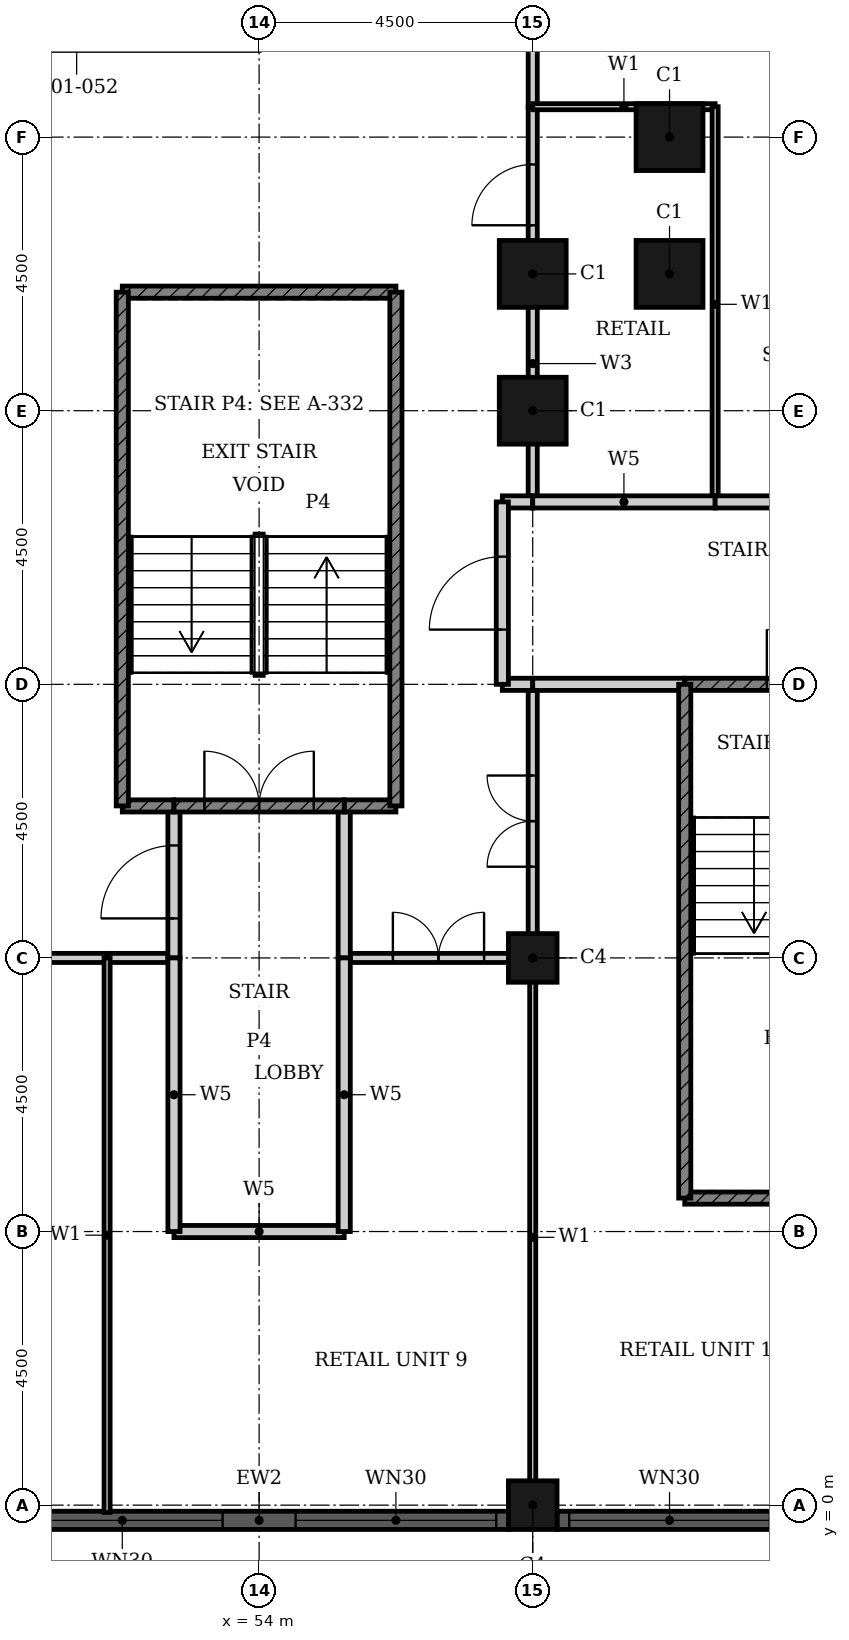
"""IFC4 building model, lengths in metres.
Left out: names, types, materials, properties, quantities, classifications, styles, units other than length and angle.
Written with IfcOpenShell. Run it as: python <this file> out.ifc"""

import sys

from ifc_helpers import new_model, si_unit, direction, frame, frame_2d, origin, origin_2d, place, context, subcontext, project, spatial, rectangle, hollow_rectangle, extrude, element, fill, save


model = new_model("IFC4")
c1 = context("Model", 3, precision=1e-05, world=origin(), true_north=direction((0.0, 1.0)))
c2 = subcontext(c1, "Body", "Model", "MODEL_VIEW")
j1 = project(units=[si_unit("LENGTHUNIT", "METRE"), si_unit("PLANEANGLEUNIT", "RADIAN")], contexts=[c1])
p1 = place(None, origin())
s1 = spatial("IfcSite", under=j1, at=p1, CompositionType="ELEMENT")
p2 = place(p1, origin())
s2 = spatial("IfcBuilding", under=s1, at=p2, CompositionType="ELEMENT")
p3 = place(p2, frame((0.0, 0.0, 6.6)))
s3 = spatial("IfcBuildingStorey", under=s2, at=p3, CompositionType="ELEMENT", Elevation=6.6)
for number, where, z_axis, x_axis in (
    (1, (58.5, 18.0, 0.0), (0.0, 0.0, 1.0), (1.0, 0.0, 0.0)),
    (2, (58.5, 20.25, 0.0), (0.0, 0.0, 1.0), (1.0, 0.0, 0.0)),
    (3, (60.75, 20.25, 0.0), (0.0, 0.0, 1.0), (1.0, 0.0, 0.0)),
    (4, (60.75, 22.5, 0.0), (0.0, 0.0, 1.0), (1.0, 0.0, 0.0)),
):
    element("IfcColumn", number, at=place(p3, frame(where, z_axis=z_axis, x_axis=x_axis)), inside=s3, PredefinedType="COLUMN", context=c2, shape_type="SweptSolid", body=[
        extrude(hollow_rectangle(XDim=1.1, YDim=1.1, WallThickness=0.036, at=origin_2d()), origin(), (0.0, 0.0, 1.0), 5.4),
    ])
for number, where, z_axis, x_axis in (
    (5, (58.5, 0.0, 0.0), (0.0, 0.0, 1.0), (1.0, 0.0, 0.0)),
    (6, (58.5, 9.0, 0.0), (0.0, 0.0, 1.0), (1.0, 0.0, 0.0)),
):
    element("IfcColumn", number, at=place(p3, frame(where, z_axis=z_axis, x_axis=x_axis)), inside=s3, PredefinedType="COLUMN", context=c2, shape_type="SweptSolid", body=[
        extrude(hollow_rectangle(XDim=0.8, YDim=0.8, WallThickness=0.025, at=origin_2d()), origin(), (0.0, 0.0, 1.0), 5.4),
    ])
p4 = place(p3, frame((49.9, -0.25, 0.0), z_axis=(0.0, 0.0, 1.0), x_axis=(1.0, 0.0, 0.0)))
e7 = element("IfcWall", 7, at=p4, inside=s3, PredefinedType="SOLIDWALL", context=c2, shape_type="SweptSolid", body=[
    extrude(rectangle(XDim=8.2, YDim=0.3, at=frame_2d((4.1, 0.0))), origin(), (0.0, 0.0, 1.0), 5.4),
])
p5 = place(p4, frame((0.2, 0.0, 0.9)))
e8 = element("IfcOpeningElement", 8, at=p5, cuts=e7, PredefinedType="OPENING", context=c2, shape_type="SweptSolid", body=[
    extrude(rectangle(XDim=3.3, YDim=3.5, at=frame_2d((1.65, 1.75))), frame((0.0, 0.16, 0.0), z_axis=(0.0, -1.0, 0.0), x_axis=(1.0, 0.0, 0.0)), (0.0, 0.0, 1.0), 0.32),
])
p6 = place(p4, frame((4.7, 0.0, 0.9)))
e9 = element("IfcOpeningElement", 9, at=p6, cuts=e7, PredefinedType="OPENING", context=c2, shape_type="SweptSolid", body=[
    extrude(rectangle(XDim=3.3, YDim=3.5, at=frame_2d((1.65, 1.75))), frame((0.0, 0.16, 0.0), z_axis=(0.0, -1.0, 0.0), x_axis=(1.0, 0.0, 0.0)), (0.0, 0.0, 1.0), 0.32),
])
p7 = place(p3, frame((58.9, -0.25, 0.0), z_axis=(0.0, 0.0, 1.0), x_axis=(1.0, 0.0, 0.0)))
e10 = element("IfcWall", 10, at=p7, inside=s3, PredefinedType="SOLIDWALL", context=c2, shape_type="SweptSolid", body=[
    extrude(rectangle(XDim=8.2, YDim=0.3, at=frame_2d((4.1, 0.0))), origin(), (0.0, 0.0, 1.0), 5.4),
])
p8 = place(p7, frame((0.2, 0.0, 0.9)))
e11 = element("IfcOpeningElement", 11, at=p8, cuts=e10, PredefinedType="OPENING", context=c2, shape_type="SweptSolid", body=[
    extrude(rectangle(XDim=3.3, YDim=3.5, at=frame_2d((1.65, 1.75))), frame((0.0, 0.16, 0.0), z_axis=(0.0, -1.0, 0.0), x_axis=(1.0, 0.0, 0.0)), (0.0, 0.0, 1.0), 0.32),
])
p9 = place(p7, frame((4.7, 0.0, 0.9)))
e12 = element("IfcOpeningElement", 12, at=p9, cuts=e10, PredefinedType="OPENING", context=c2, shape_type="SweptSolid", body=[
    extrude(rectangle(XDim=3.3, YDim=3.5, at=frame_2d((1.65, 1.75))), frame((0.0, 0.16, 0.0), z_axis=(0.0, -1.0, 0.0), x_axis=(1.0, 0.0, 0.0)), (0.0, 0.0, 1.0), 0.32),
])
p10 = place(p3, frame((41.5, 9.0, 0.0), z_axis=(0.0, 0.0, 1.0), x_axis=(1.0, 0.0, 0.0)))
e13 = element("IfcWall", 13, at=p10, inside=s3, PredefinedType="PARTITIONING", context=c2, shape_type="SweptSolid", body=[
    extrude(rectangle(XDim=10.0, YDim=0.15, at=frame_2d((5.0, 0.0))), origin(), (0.0, 0.0, 1.0), 5.05),
])
p11 = place(p10, frame((4.25, 0.0, 0.0)))
e14 = element("IfcOpeningElement", 14, at=p11, cuts=e13, PredefinedType="OPENING", context=c2, shape_type="SweptSolid", body=[
    extrude(rectangle(XDim=1.5, YDim=2.4, at=frame_2d((0.75, 1.2))), frame((0.0, 0.085, 0.0), z_axis=(0.0, -1.0, 0.0), x_axis=(1.0, 0.0, 0.0)), (0.0, 0.0, 1.0), 0.17),
])
p12 = place(p3, frame((51.5, 9.0, 0.0), z_axis=(0.0, 0.0, 1.0), x_axis=(1.0, 0.0, 0.0)))
e15 = element("IfcWall", 15, at=p12, inside=s3, PredefinedType="PARTITIONING", context=c2, shape_type="SweptSolid", body=[
    extrude(rectangle(XDim=1.1, YDim=0.15, at=frame_2d((0.55, 0.0))), origin(), (0.0, 0.0, 1.0), 5.05),
])
p13 = place(p3, frame((55.4, 9.0, 0.0), z_axis=(0.0, 0.0, 1.0), x_axis=(1.0, 0.0, 0.0)))
e16 = element("IfcWall", 16, at=p13, inside=s3, PredefinedType="PARTITIONING", context=c2, shape_type="SweptSolid", body=[
    extrude(rectangle(XDim=3.1, YDim=0.15, at=frame_2d((1.55, 0.0))), origin(), (0.0, 0.0, 1.0), 5.05),
])
p14 = place(p13, frame((0.8, 0.0, 0.0)))
e17 = element("IfcOpeningElement", 17, at=p14, cuts=e16, PredefinedType="OPENING", context=c2, shape_type="SweptSolid", body=[
    extrude(rectangle(XDim=1.5, YDim=2.4, at=frame_2d((0.75, 1.2))), frame((0.0, 0.085, 0.0), z_axis=(0.0, -1.0, 0.0), x_axis=(1.0, 0.0, 0.0)), (0.0, 0.0, 1.0), 0.17),
])
p15 = place(p3, frame((58.5, 16.5, 0.0), z_axis=(0.0, 0.0, 1.0), x_axis=(0.0, 1.0, 0.0)))
e18 = element("IfcWall", 18, at=p15, inside=s3, PredefinedType="PARTITIONING", context=c2, shape_type="SweptSolid", body=[
    extrude(rectangle(XDim=6.5, YDim=0.15, at=frame_2d((3.25, 0.0))), origin(), (0.0, 0.0, 1.0), 5.05),
])
p16 = place(p15, frame((4.55, 0.0, 0.0)))
e19 = element("IfcOpeningElement", 19, at=p16, cuts=e18, PredefinedType="OPENING", context=c2, shape_type="SweptSolid", body=[
    extrude(rectangle(XDim=1.0, YDim=2.1, at=frame_2d((0.5, 1.05))), frame((0.0, 0.085, 0.0), z_axis=(0.0, -1.0, 0.0), x_axis=(1.0, 0.0, 0.0)), (0.0, 0.0, 1.0), 0.17),
])
p17 = place(p3, frame((58.5, 9.0, 0.0), z_axis=(0.0, 0.0, 1.0), x_axis=(0.0, 1.0, 0.0)))
e20 = element("IfcWall", 20, at=p17, inside=s3, PredefinedType="PARTITIONING", context=c2, shape_type="SweptSolid", body=[
    extrude(rectangle(XDim=4.5, YDim=0.15, at=frame_2d((2.25, 0.0))), origin(), (0.0, 0.0, 1.0), 5.05),
])
p18 = place(p17, frame((1.5, 0.0, 0.0)))
e21 = element("IfcOpeningElement", 21, at=p18, cuts=e20, PredefinedType="OPENING", context=c2, shape_type="SweptSolid", body=[
    extrude(rectangle(XDim=1.5, YDim=2.4, at=frame_2d((0.75, 1.2))), frame((0.0, 0.085, 0.0), z_axis=(0.0, -1.0, 0.0), x_axis=(1.0, 0.0, 0.0)), (0.0, 0.0, 1.0), 0.17),
])
p19 = place(p3, frame((58.5, 23.0, 0.0), z_axis=(0.0, 0.0, 1.0), x_axis=(0.0, 1.0, 0.0)))
e22 = element("IfcWall", 22, at=p19, inside=s3, PredefinedType="PARTITIONING", context=c2, shape_type="SweptSolid", body=[
    extrude(rectangle(XDim=6.5, YDim=0.15, at=frame_2d((3.25, 0.0))), origin(), (0.0, 0.0, 1.0), 5.05),
])
p20 = place(p19, frame((1.6, 0.0, 0.0)))
e23 = element("IfcOpeningElement", 23, at=p20, cuts=e22, PredefinedType="OPENING", context=c2, shape_type="SweptSolid", body=[
    extrude(rectangle(XDim=1.5, YDim=2.4, at=frame_2d((0.75, 1.2))), frame((0.0, 0.085, 0.0), z_axis=(0.0, -1.0, 0.0), x_axis=(1.0, 0.0, 0.0)), (0.0, 0.0, 1.0), 0.17),
])
p21 = place(p3, frame((58.5, 23.0, 0.0), z_axis=(0.0, 0.0, 1.0), x_axis=(1.0, 0.0, 0.0)))
e24 = element("IfcWall", 24, at=p21, inside=s3, PredefinedType="PARTITIONING", context=c2, shape_type="SweptSolid", body=[
    extrude(rectangle(XDim=3.0, YDim=0.1, at=frame_2d((1.5, 0.0))), origin(), (0.0, 0.0, 1.0), 5.05),
])
p22 = place(p3, frame((51.5, -0.12, 0.0), z_axis=(0.0, 0.0, 1.0), x_axis=(0.0, 1.0, 0.0)))
e25 = element("IfcWall", 25, at=p22, inside=s3, PredefinedType="PARTITIONING", context=c2, shape_type="SweptSolid", body=[
    extrude(rectangle(XDim=9.12, YDim=0.1, at=frame_2d((4.56, 0.0))), origin(), (0.0, 0.0, 1.0), 5.05),
])
p23 = place(p3, frame((58.5, -0.19, 0.0), z_axis=(0.0, 0.0, 1.0), x_axis=(0.0, 1.0, 0.0)))
e26 = element("IfcWall", 26, at=p23, inside=s3, PredefinedType="PARTITIONING", context=c2, shape_type="SweptSolid", body=[
    extrude(rectangle(XDim=9.19, YDim=0.1, at=frame_2d((4.595, 0.0))), origin(), (0.0, 0.0, 1.0), 5.05),
])
p24 = place(p3, frame((61.5, 16.5, 0.0), z_axis=(0.0, 0.0, 1.0), x_axis=(0.0, 1.0, 0.0)))
e27 = element("IfcWall", 27, at=p24, inside=s3, PredefinedType="PARTITIONING", context=c2, shape_type="SweptSolid", body=[
    extrude(rectangle(XDim=6.5, YDim=0.1, at=frame_2d((3.25, 0.0))), origin(), (0.0, 0.0, 1.0), 5.05),
])
p25 = place(p3, frame((58.0, 13.5, 0.0), z_axis=(0.0, 0.0, 1.0), x_axis=(1.0, 0.0, 0.0)))
e28 = element("IfcWall", 28, at=p25, inside=s3, PredefinedType="PARTITIONING", context=c2, shape_type="SweptSolid", body=[
    extrude(rectangle(XDim=0.5, YDim=0.2, at=frame_2d((0.25, 0.0))), origin(), (0.0, 0.0, 1.0), 5.05),
])
p26 = place(p3, frame((58.5, 13.5, 0.0), z_axis=(0.0, 0.0, 1.0), x_axis=(1.0, 0.0, 0.0)))
e29 = element("IfcWall", 29, at=p26, inside=s3, PredefinedType="PARTITIONING", context=c2, shape_type="SweptSolid", body=[
    extrude(rectangle(XDim=2.5, YDim=0.2, at=frame_2d((1.25, 0.0))), origin(), (0.0, 0.0, 1.0), 5.05),
])
p27 = place(p3, frame((58.0, 16.5, 0.0), z_axis=(0.0, 0.0, 1.0), x_axis=(1.0, 0.0, 0.0)))
e30 = element("IfcWall", 30, at=p27, inside=s3, PredefinedType="PARTITIONING", context=c2, shape_type="SweptSolid", body=[
    extrude(rectangle(XDim=0.5, YDim=0.2, at=frame_2d((0.25, 0.0))), origin(), (0.0, 0.0, 1.0), 5.05),
])
p28 = place(p3, frame((58.5, 16.5, 0.0), z_axis=(0.0, 0.0, 1.0), x_axis=(1.0, 0.0, 0.0)))
e31 = element("IfcWall", 31, at=p28, inside=s3, PredefinedType="PARTITIONING", context=c2, shape_type="SweptSolid", body=[
    extrude(rectangle(XDim=3.0, YDim=0.2, at=frame_2d((1.5, 0.0))), origin(), (0.0, 0.0, 1.0), 5.05),
])
p29 = place(p3, frame((61.5, 16.5, 0.0), z_axis=(0.0, 0.0, 1.0), x_axis=(1.0, 0.0, 0.0)))
e32 = element("IfcWall", 32, at=p29, inside=s3, PredefinedType="PARTITIONING", context=c2, shape_type="SweptSolid", body=[
    extrude(rectangle(XDim=6.12, YDim=0.2, at=frame_2d((3.06, 0.0))), origin(), (0.0, 0.0, 1.0), 5.05),
])
p30 = place(p3, frame((52.6, 4.5, 0.0), z_axis=(0.0, 0.0, 1.0), x_axis=(1.0, 0.0, 0.0)))
e33 = element("IfcWall", 33, at=p30, inside=s3, PredefinedType="PARTITIONING", context=c2, shape_type="SweptSolid", body=[
    extrude(rectangle(XDim=2.8, YDim=0.2, at=frame_2d((1.4, 0.0))), origin(), (0.0, 0.0, 1.0), 5.05),
])
p31 = place(p3, frame((52.6, 9.0, 0.0), z_axis=(0.0, 0.0, 1.0), x_axis=(0.0, 1.0, 0.0)))
e34 = element("IfcWall", 34, at=p31, inside=s3, PredefinedType="PARTITIONING", context=c2, shape_type="SweptSolid", body=[
    extrude(rectangle(XDim=2.5, YDim=0.2, at=frame_2d((1.25, 0.0))), origin(), (0.0, 0.0, 1.0), 5.05),
])
p32 = place(p31, frame((0.65, 0.0, 0.0)))
e35 = element("IfcOpeningElement", 35, at=p32, cuts=e34, PredefinedType="OPENING", context=c2, shape_type="SweptSolid", body=[
    extrude(rectangle(XDim=1.2, YDim=2.1, at=frame_2d((0.6, 1.05))), frame((0.0, 0.11, 0.0), z_axis=(0.0, -1.0, 0.0), x_axis=(1.0, 0.0, 0.0)), (0.0, 0.0, 1.0), 0.22),
])
p33 = place(p3, frame((52.6, 4.5, 0.0), z_axis=(0.0, 0.0, 1.0), x_axis=(0.0, 1.0, 0.0)))
e36 = element("IfcWall", 36, at=p33, inside=s3, PredefinedType="PARTITIONING", context=c2, shape_type="SweptSolid", body=[
    extrude(rectangle(XDim=4.5, YDim=0.2, at=frame_2d((2.25, 0.0))), origin(), (0.0, 0.0, 1.0), 5.05),
])
p34 = place(p3, frame((55.4, 9.0, 0.0), z_axis=(0.0, 0.0, 1.0), x_axis=(0.0, 1.0, 0.0)))
e37 = element("IfcWall", 37, at=p34, inside=s3, PredefinedType="PARTITIONING", context=c2, shape_type="SweptSolid", body=[
    extrude(rectangle(XDim=2.5, YDim=0.2, at=frame_2d((1.25, 0.0))), origin(), (0.0, 0.0, 1.0), 5.05),
])
p35 = place(p3, frame((55.4, 4.5, 0.0), z_axis=(0.0, 0.0, 1.0), x_axis=(0.0, 1.0, 0.0)))
e38 = element("IfcWall", 38, at=p35, inside=s3, PredefinedType="PARTITIONING", context=c2, shape_type="SweptSolid", body=[
    extrude(rectangle(XDim=4.5, YDim=0.2, at=frame_2d((2.25, 0.0))), origin(), (0.0, 0.0, 1.0), 5.05),
])
p36 = place(p3, frame((58.0, 13.5, 0.0), z_axis=(0.0, 0.0, 1.0), x_axis=(0.0, 1.0, 0.0)))
e39 = element("IfcWall", 39, at=p36, inside=s3, PredefinedType="PARTITIONING", context=c2, shape_type="SweptSolid", body=[
    extrude(rectangle(XDim=3.0, YDim=0.2, at=frame_2d((1.5, 0.0))), origin(), (0.0, 0.0, 1.0), 5.05),
])
p37 = place(p36, frame((0.9, 0.0, 0.0)))
e40 = element("IfcOpeningElement", 40, at=p37, cuts=e39, PredefinedType="OPENING", context=c2, shape_type="SweptSolid", body=[
    extrude(rectangle(XDim=1.2, YDim=2.1, at=frame_2d((0.6, 1.05))), frame((0.0, 0.11, 0.0), z_axis=(0.0, -1.0, 0.0), x_axis=(1.0, 0.0, 0.0)), (0.0, 0.0, 1.0), 0.22),
])
for number, where, z_axis, x_axis in (
    (41, (51.75, 11.5, 0.0), (0.0, 0.0, 1.0), (1.0, 0.0, 0.0)),
    (42, (55.4, 11.5, 0.0), (0.0, 0.0, 1.0), (1.0, 0.0, 0.0)),
):
    element("IfcWall", number, at=place(p3, frame(where, z_axis=z_axis, x_axis=x_axis)), inside=s3, PredefinedType="SHEAR", context=c2, shape_type="SweptSolid", body=[
        extrude(rectangle(XDim=0.85, YDim=0.2, at=frame_2d((0.425, 0.0))), origin(), (0.0, 0.0, 1.0), 5.05),
    ])
p38 = place(p3, frame((52.6, 11.5, 0.0), z_axis=(0.0, 0.0, 1.0), x_axis=(1.0, 0.0, 0.0)))
e43 = element("IfcWall", 43, at=p38, inside=s3, PredefinedType="SHEAR", context=c2, shape_type="SweptSolid", body=[
    extrude(rectangle(XDim=2.8, YDim=0.2, at=frame_2d((1.4, 0.0))), origin(), (0.0, 0.0, 1.0), 5.05),
])
p39 = place(p38, frame((0.5, 0.0, 0.0)))
e44 = element("IfcOpeningElement", 44, at=p39, cuts=e43, PredefinedType="OPENING", context=c2, shape_type="SweptSolid", body=[
    extrude(rectangle(XDim=1.8, YDim=2.1, at=frame_2d((0.9, 1.05))), frame((0.0, 0.11, 0.0), z_axis=(0.0, -1.0, 0.0), x_axis=(1.0, 0.0, 0.0)), (0.0, 0.0, 1.0), 0.22),
])
p40 = place(p3, frame((61.0, 13.5, 0.0), z_axis=(0.0, 0.0, 1.0), x_axis=(1.0, 0.0, 0.0)))
e45 = element("IfcWall", 45, at=p40, inside=s3, PredefinedType="SHEAR", context=c2, shape_type="SweptSolid", body=[
    extrude(rectangle(XDim=4.5, YDim=0.2, at=frame_2d((2.25, 0.0))), origin(), (0.0, 0.0, 1.0), 5.05),
])
p41 = place(p40, frame((1.35, 0.0, 0.0)))
e46 = element("IfcOpeningElement", 46, at=p41, cuts=e45, PredefinedType="OPENING", context=c2, shape_type="SweptSolid", body=[
    extrude(rectangle(XDim=1.8, YDim=2.1, at=frame_2d((0.9, 1.05))), frame((0.0, 0.11, 0.0), z_axis=(0.0, -1.0, 0.0), x_axis=(1.0, 0.0, 0.0)), (0.0, 0.0, 1.0), 0.22),
])
for number, where, z_axis, x_axis in (
    (47, (51.75, 19.95, 0.0), (0.0, 0.0, 1.0), (1.0, 0.0, 0.0)),
    (48, (61.0, 5.05, 0.0), (0.0, 0.0, 1.0), (1.0, 0.0, 0.0)),
):
    element("IfcWall", number, at=place(p3, frame(where, z_axis=z_axis, x_axis=x_axis)), inside=s3, PredefinedType="SHEAR", context=c2, shape_type="SweptSolid", body=[
        extrude(rectangle(XDim=4.5, YDim=0.2, at=frame_2d((2.25, 0.0))), origin(), (0.0, 0.0, 1.0), 5.05),
    ])
for number, where, z_axis, x_axis in (
    (49, (51.75, 11.5, 0.0), (0.0, 0.0, 1.0), (0.0, 1.0, 0.0)),
    (50, (56.25, 11.5, 0.0), (0.0, 0.0, 1.0), (0.0, 1.0, 0.0)),
    (51, (61.0, 5.05, 0.0), (0.0, 0.0, 1.0), (0.0, 1.0, 0.0)),
):
    element("IfcWall", number, at=place(p3, frame(where, z_axis=z_axis, x_axis=x_axis)), inside=s3, PredefinedType="SHEAR", context=c2, shape_type="SweptSolid", body=[
        extrude(rectangle(XDim=8.45, YDim=0.2, at=frame_2d((4.225, 0.0))), origin(), (0.0, 0.0, 1.0), 5.05),
    ])
p42 = place(p5, origin())
e52 = element("IfcWindow", 52, at=p42, inside=s3, PartitioningType="SINGLE_PANEL", PredefinedType="WINDOW", context=c2, shape_type="SweptSolid", body=[
    extrude(rectangle(XDim=3.3, YDim=3.5, at=frame_2d((1.65, 1.75))), frame((0.0, 0.03, 0.0), z_axis=(0.0, -1.0, 0.0), x_axis=(1.0, 0.0, 0.0)), (0.0, 0.0, 1.0), 0.06),
])
fill(e8, e52)
p43 = place(p6, origin())
e53 = element("IfcWindow", 53, at=p43, inside=s3, PartitioningType="SINGLE_PANEL", PredefinedType="WINDOW", context=c2, shape_type="SweptSolid", body=[
    extrude(rectangle(XDim=3.3, YDim=3.5, at=frame_2d((1.65, 1.75))), frame((0.0, 0.03, 0.0), z_axis=(0.0, -1.0, 0.0), x_axis=(1.0, 0.0, 0.0)), (0.0, 0.0, 1.0), 0.06),
])
fill(e9, e53)
p44 = place(p8, origin())
e54 = element("IfcWindow", 54, at=p44, inside=s3, PartitioningType="SINGLE_PANEL", PredefinedType="WINDOW", context=c2, shape_type="SweptSolid", body=[
    extrude(rectangle(XDim=3.3, YDim=3.5, at=frame_2d((1.65, 1.75))), frame((0.0, 0.03, 0.0), z_axis=(0.0, -1.0, 0.0), x_axis=(1.0, 0.0, 0.0)), (0.0, 0.0, 1.0), 0.06),
])
fill(e11, e54)
p45 = place(p32, origin())
e55 = element("IfcDoor", 55, at=p45, inside=s3, OperationType="SINGLE_SWING_RIGHT", PredefinedType="DOOR", context=c2, shape_type="SweptSolid", body=[
    extrude(rectangle(XDim=1.2, YDim=2.1, at=frame_2d((0.6, 1.05))), frame((0.0, 0.025, 0.0), z_axis=(0.0, -1.0, 0.0), x_axis=(1.0, 0.0, 0.0)), (0.0, 0.0, 1.0), 0.05),
])
fill(e35, e55)
p46 = place(p39, origin())
e56 = element("IfcDoor", 56, at=p46, inside=s3, OperationType="DOUBLE_DOOR_SINGLE_SWING", PredefinedType="DOOR", context=c2, shape_type="SweptSolid", body=[
    extrude(rectangle(XDim=1.8, YDim=2.1, at=frame_2d((0.9, 1.05))), frame((0.0, 0.025, 0.0), z_axis=(0.0, -1.0, 0.0), x_axis=(1.0, 0.0, 0.0)), (0.0, 0.0, 1.0), 0.05),
])
fill(e44, e56)
p47 = place(p37, origin())
e57 = element("IfcDoor", 57, at=p47, inside=s3, OperationType="SINGLE_SWING_RIGHT", PredefinedType="DOOR", context=c2, shape_type="SweptSolid", body=[
    extrude(rectangle(XDim=1.2, YDim=2.1, at=frame_2d((0.6, 1.05))), frame((0.0, 0.025, 0.0), z_axis=(0.0, -1.0, 0.0), x_axis=(1.0, 0.0, 0.0)), (0.0, 0.0, 1.0), 0.05),
])
fill(e40, e57)
p48 = place(p41, origin())
e58 = element("IfcDoor", 58, at=p48, inside=s3, OperationType="DOUBLE_DOOR_SINGLE_SWING", PredefinedType="DOOR", context=c2, shape_type="SweptSolid", body=[
    extrude(rectangle(XDim=1.8, YDim=2.1, at=frame_2d((0.9, 1.05))), frame((0.0, 0.025, 0.0), z_axis=(0.0, -1.0, 0.0), x_axis=(1.0, 0.0, 0.0)), (0.0, 0.0, 1.0), 0.05),
])
fill(e46, e58)
p49 = place(p16, origin())
e59 = element("IfcDoor", 59, at=p49, inside=s3, OperationType="SINGLE_SWING_RIGHT", PredefinedType="DOOR", context=c2, shape_type="SweptSolid", body=[
    extrude(rectangle(XDim=1.0, YDim=2.1, at=frame_2d((0.5, 1.05))), frame((0.0, 0.025, 0.0), z_axis=(0.0, -1.0, 0.0), x_axis=(1.0, 0.0, 0.0)), (0.0, 0.0, 1.0), 0.05),
])
fill(e19, e59)
p50 = place(p18, origin())
e60 = element("IfcDoor", 60, at=p50, inside=s3, OperationType="DOUBLE_DOOR_SINGLE_SWING", PredefinedType="DOOR", context=c2, shape_type="SweptSolid", body=[
    extrude(rectangle(XDim=1.5, YDim=2.4, at=frame_2d((0.75, 1.2))), frame((0.0, 0.025, 0.0), z_axis=(0.0, -1.0, 0.0), x_axis=(1.0, 0.0, 0.0)), (0.0, 0.0, 1.0), 0.05),
])
fill(e21, e60)
p51 = place(p14, origin())
e61 = element("IfcDoor", 61, at=p51, inside=s3, OperationType="DOUBLE_DOOR_SINGLE_SWING", PredefinedType="DOOR", context=c2, shape_type="SweptSolid", body=[
    extrude(rectangle(XDim=1.5, YDim=2.4, at=frame_2d((0.75, 1.2))), frame((0.0, 0.025, 0.0), z_axis=(0.0, -1.0, 0.0), x_axis=(1.0, 0.0, 0.0)), (0.0, 0.0, 1.0), 0.05),
])
fill(e17, e61)
save(model, sys.argv[1])
